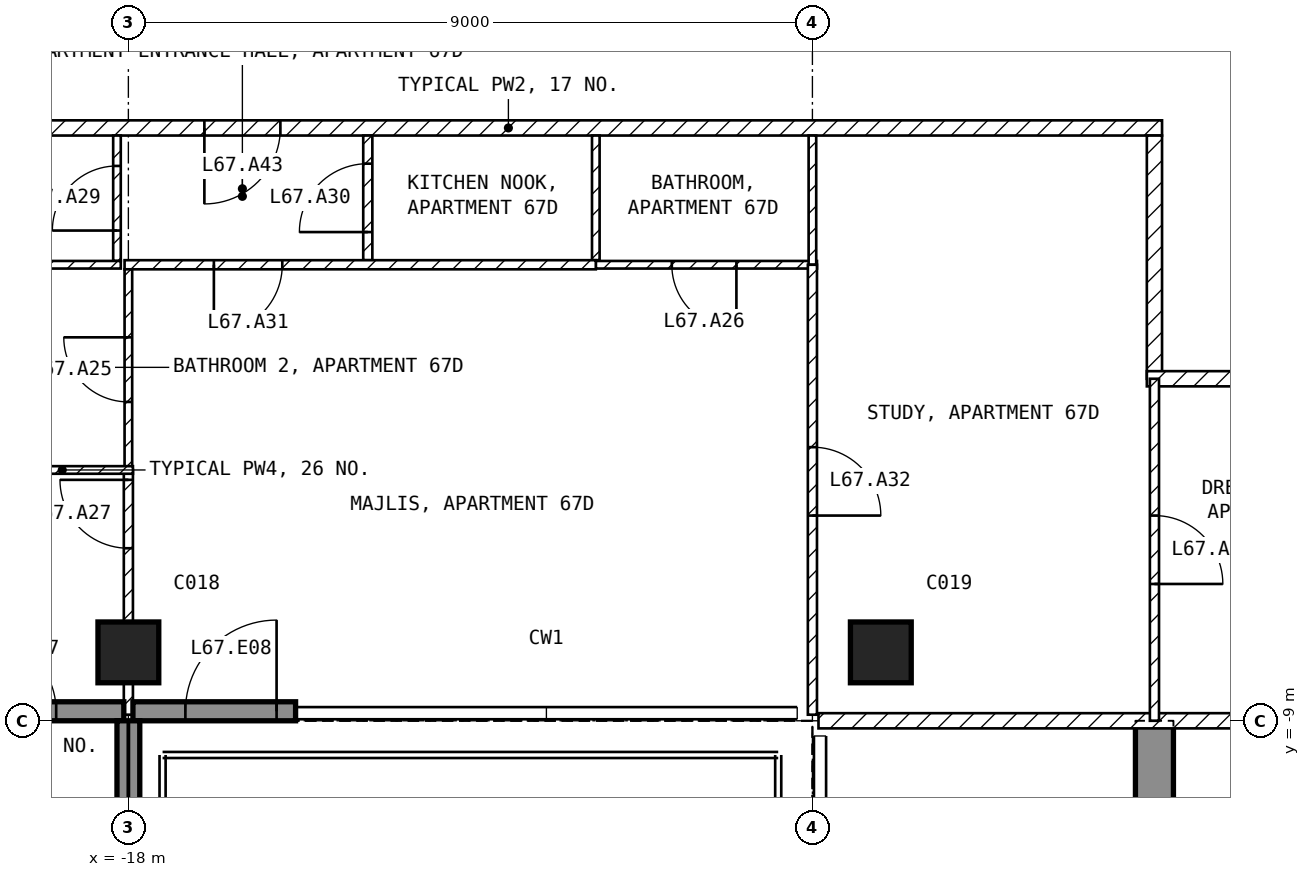
"""IFC4 building model, lengths in metres.
Left out: names, types, materials, properties, quantities, classifications, styles, units other than length and angle.
Written with IfcOpenShell. Run it as: python <this file> out.ifc"""

import sys

from ifc_helpers import new_model, si_unit, direction, frame, frame_2d, origin, origin_2d, place, context, subcontext, project, spatial, polyline, rectangle, outline, extrude, element, fill, save


model = new_model("IFC4")
c1 = context("Model", 3, precision=1e-05, world=origin(), true_north=direction((0.0, 1.0)))
c2 = subcontext(c1, "Body", "Model", "MODEL_VIEW")
j1 = project(units=[si_unit("LENGTHUNIT", "METRE"), si_unit("PLANEANGLEUNIT", "RADIAN")], contexts=[c1])
p1 = place(None, origin())
s1 = spatial("IfcSite", under=j1, at=p1, CompositionType="ELEMENT")
p2 = place(p1, origin())
s2 = spatial("IfcBuilding", under=s1, at=p2, CompositionType="ELEMENT")
p3 = place(p2, frame((0.0, 0.0, 264.0)))
s3 = spatial("IfcBuildingStorey", under=s2, at=p3, CompositionType="ELEMENT", Elevation=264.0)
for number, where, z_axis, x_axis in (
    (1, (-18.0, -8.1, -0.25), (0.0, 0.0, 1.0), (1.0, 0.0, 0.0)),
    (2, (-8.1, -8.1, -0.25), (0.0, 0.0, 1.0), (1.0, 0.0, 0.0)),
):
    element("IfcColumn", number, at=place(p3, frame(where, z_axis=z_axis, x_axis=x_axis)), inside=s3, PredefinedType="COLUMN", context=c2, shape_type="SweptSolid", body=[
        extrude(rectangle(XDim=0.8, YDim=0.8, at=origin_2d()), origin(), (0.0, 0.0, 1.0), 3.5),
    ])
p4 = place(p3, frame((-4.75, -16.7, -0.25), z_axis=(1.0, 0.0, 0.0), x_axis=(0.0, 1.0, 0.0)))
e3 = element("IfcWall", 3, at=p4, inside=s3, PredefinedType="SHEAR", context=c2, shape_type="SweptSolid", body=[
    extrude(outline(polyline([(0.0, 0.0), (3.2, 0.0), (3.2, 2.65), (5.6, 2.65), (5.6, 0.0), (7.7, 0.0), (7.7, 3.5), (0.0, 3.5), (0.0, 0.0)])), origin(), (0.0, 0.0, 1.0), 0.5),
])
p5 = place(p3, frame((-21.1, -8.875, 0.0), z_axis=(0.0, 0.0, 1.0), x_axis=(1.0, 0.0, 0.0)))
e4 = element("IfcWall", 4, at=p5, inside=s3, PredefinedType="SOLIDWALL", context=c2, shape_type="SweptSolid", body=[
    extrude(rectangle(XDim=3.04, YDim=0.25, at=frame_2d((1.52, 0.0))), origin(), (0.0, 0.0, 1.0), 3.25),
])
p6 = place(p5, frame((1.15, 0.0, 0.0)))
e5 = element("IfcOpeningElement", 5, at=p6, cuts=e4, PredefinedType="OPENING", context=c2, shape_type="SweptSolid", body=[
    extrude(rectangle(XDim=1.0, YDim=2.4, at=frame_2d((0.5, 1.2))), frame((0.0, 0.135, 0.0), z_axis=(0.0, -1.0, 0.0), x_axis=(1.0, 0.0, 0.0)), (0.0, 0.0, 1.0), 0.27),
])
p7 = place(p3, frame((-17.94, -8.875, 0.0), z_axis=(0.0, 0.0, 1.0), x_axis=(1.0, 0.0, 0.0)))
e6 = element("IfcWall", 6, at=p7, inside=s3, PredefinedType="SOLIDWALL", context=c2, shape_type="SweptSolid", body=[
    extrude(rectangle(XDim=2.14, YDim=0.25, at=frame_2d((1.07, 0.0))), origin(), (0.0, 0.0, 1.0), 3.25),
])
p8 = place(p7, frame((0.69, 0.0, 0.0)))
e7 = element("IfcOpeningElement", 7, at=p8, cuts=e6, PredefinedType="OPENING", context=c2, shape_type="SweptSolid", body=[
    extrude(rectangle(XDim=1.2, YDim=2.4, at=frame_2d((0.6, 1.2))), frame((0.0, 0.135, 0.0), z_axis=(0.0, -1.0, 0.0), x_axis=(1.0, 0.0, 0.0)), (0.0, 0.0, 1.0), 0.27),
])
p9 = place(p3, frame((-18.0, -9.0, 0.0), z_axis=(0.0, 0.0, 1.0), x_axis=(0.0, -1.0, 0.0)))
e8 = element("IfcWall", 8, at=p9, inside=s3, PredefinedType="SOLIDWALL", context=c2, shape_type="SweptSolid", body=[
    extrude(rectangle(XDim=2.74, YDim=0.3, at=frame_2d((1.37, 0.0))), origin(), (0.0, 0.0, 1.0), 3.25),
])
p10 = place(p3, frame((-4.4, -1.2, 0.0), z_axis=(0.0, 0.0, 1.0), x_axis=(-1.0, 0.0, 0.0)))
e9 = element("IfcWall", 9, at=p10, inside=s3, PredefinedType="PARTITIONING", context=c2, shape_type="SweptSolid", body=[
    extrude(rectangle(XDim=17.2, YDim=0.2, at=frame_2d((8.6, 0.0))), origin(), (0.0, 0.0, 1.0), 3.25),
])
p11 = place(p10, frame((11.6, 0.0, 0.0)))
e10 = element("IfcOpeningElement", 10, at=p11, cuts=e9, PredefinedType="OPENING", context=c2, shape_type="SweptSolid", body=[
    extrude(rectangle(XDim=1.0, YDim=2.1, at=frame_2d((0.5, 1.05))), frame((0.0, 0.11, 0.0), z_axis=(0.0, -1.0, 0.0), x_axis=(1.0, 0.0, 0.0)), (0.0, 0.0, 1.0), 0.22),
])
p12 = place(p3, frame((-4.5, -4.5, 0.0), z_axis=(0.0, 0.0, 1.0), x_axis=(0.0, 1.0, 0.0)))
e11 = element("IfcWall", 11, at=p12, inside=s3, PredefinedType="PARTITIONING", context=c2, shape_type="SweptSolid", body=[
    extrude(rectangle(XDim=3.2, YDim=0.2, at=frame_2d((1.6, 0.0))), origin(), (0.0, 0.0, 1.0), 3.25),
])
p13 = place(p3, frame((-1.1, -4.5, 0.0), z_axis=(0.0, 0.0, 1.0), x_axis=(-1.0, 0.0, 0.0)))
e12 = element("IfcWall", 12, at=p13, inside=s3, PredefinedType="PARTITIONING", context=c2, shape_type="SweptSolid", body=[
    extrude(rectangle(XDim=3.5, YDim=0.2, at=frame_2d((1.75, 0.0))), origin(), (0.0, 0.0, 1.0), 3.25),
])
p14 = place(p3, frame((8.92, -9.0, 0.0), z_axis=(0.0, 0.0, 1.0), x_axis=(-1.0, 0.0, 0.0)))
e13 = element("IfcWall", 13, at=p14, inside=s3, PredefinedType="PARTITIONING", context=c2, shape_type="SweptSolid", body=[
    extrude(rectangle(XDim=17.84, YDim=0.2, at=frame_2d((8.92, 0.0))), origin(), (0.0, 0.0, 1.0), 3.25),
])
p15 = place(p14, frame((8.42, 0.0, 0.0)))
e14 = element("IfcOpeningElement", 14, at=p15, cuts=e13, PredefinedType="OPENING", context=c2, shape_type="SweptSolid", body=[
    extrude(rectangle(XDim=1.0, YDim=2.1, at=frame_2d((0.5, 1.05))), frame((0.0, 0.11, 0.0), z_axis=(0.0, -1.0, 0.0), x_axis=(1.0, 0.0, 0.0)), (0.0, 0.0, 1.0), 0.22),
])
p16 = place(p3, frame((-11.85, -2.94, 0.0), z_axis=(0.0, 0.0, 1.0), x_axis=(0.0, 1.0, 0.0)))
e15 = element("IfcWall", 15, at=p16, inside=s3, PredefinedType="PARTITIONING", context=c2, shape_type="SweptSolid", body=[
    extrude(rectangle(XDim=1.64, YDim=0.1, at=frame_2d((0.82, 0.0))), origin(), (0.0, 0.0, 1.0), 3.25),
])
p17 = place(p3, frame((-8.94, -3.0, 0.0), z_axis=(0.0, 0.0, 1.0), x_axis=(-1.0, 0.0, 0.0)))
e16 = element("IfcWall", 16, at=p17, inside=s3, PredefinedType="PARTITIONING", context=c2, shape_type="SweptSolid", body=[
    extrude(rectangle(XDim=2.91, YDim=0.1, at=frame_2d((1.455, 0.0))), origin(), (0.0, 0.0, 1.0), 3.25),
])
p18 = place(p17, frame((1.06, 0.0, 0.0)))
e17 = element("IfcOpeningElement", 17, at=p18, cuts=e16, PredefinedType="OPENING", context=c2, shape_type="SweptSolid", body=[
    extrude(rectangle(XDim=0.85, YDim=2.1, at=frame_2d((0.425, 1.05))), frame((0.0, 0.06, 0.0), z_axis=(0.0, -1.0, 0.0), x_axis=(1.0, 0.0, 0.0)), (0.0, 0.0, 1.0), 0.12),
])
p19 = place(p3, frame((-9.0, -1.3, 0.0), z_axis=(0.0, 0.0, 1.0), x_axis=(0.0, -1.0, 0.0)))
e18 = element("IfcWall", 18, at=p19, inside=s3, PredefinedType="PARTITIONING", context=c2, shape_type="SweptSolid", body=[
    extrude(rectangle(XDim=1.7, YDim=0.1, at=frame_2d((0.85, 0.0))), origin(), (0.0, 0.0, 1.0), 3.25),
])
p20 = place(p3, frame((-14.85, -2.94, 0.0), z_axis=(0.0, 0.0, 1.0), x_axis=(0.0, 1.0, 0.0)))
e19 = element("IfcWall", 19, at=p20, inside=s3, PredefinedType="PARTITIONING", context=c2, shape_type="SweptSolid", body=[
    extrude(rectangle(XDim=1.64, YDim=0.12, at=frame_2d((0.82, 0.0))), origin(), (0.0, 0.0, 1.0), 3.25),
])
p21 = place(p20, frame((0.37, 0.0, 0.0)))
e20 = element("IfcOpeningElement", 20, at=p21, cuts=e19, PredefinedType="OPENING", context=c2, shape_type="SweptSolid", body=[
    extrude(rectangle(XDim=0.9, YDim=2.1, at=frame_2d((0.45, 1.05))), frame((0.0, 0.07, 0.0), z_axis=(0.0, -1.0, 0.0), x_axis=(1.0, 0.0, 0.0)), (0.0, 0.0, 1.0), 0.14),
])
p22 = place(p3, frame((-11.85, -3.0, 0.0), z_axis=(0.0, 0.0, 1.0), x_axis=(-1.0, 0.0, 0.0)))
e21 = element("IfcWall", 21, at=p22, inside=s3, PredefinedType="PARTITIONING", context=c2, shape_type="SweptSolid", body=[
    extrude(rectangle(XDim=6.2, YDim=0.12, at=frame_2d((3.1, 0.0))), origin(), (0.0, 0.0, 1.0), 3.25),
])
p23 = place(p22, frame((4.125, 0.0, 0.0)))
e22 = element("IfcOpeningElement", 22, at=p23, cuts=e21, PredefinedType="OPENING", context=c2, shape_type="SweptSolid", body=[
    extrude(rectangle(XDim=0.9, YDim=2.1, at=frame_2d((0.45, 1.05))), frame((0.0, 0.07, 0.0), z_axis=(0.0, -1.0, 0.0), x_axis=(1.0, 0.0, 0.0)), (0.0, 0.0, 1.0), 0.14),
])
p24 = place(p3, frame((-18.15, -2.95, 0.0), z_axis=(0.0, 0.0, 1.0), x_axis=(0.0, 1.0, 0.0)))
e23 = element("IfcWall", 23, at=p24, inside=s3, PredefinedType="PARTITIONING", context=c2, shape_type="SweptSolid", body=[
    extrude(rectangle(XDim=1.65, YDim=0.1, at=frame_2d((0.825, 0.0))), origin(), (0.0, 0.0, 1.0), 2.496),
])
p25 = place(p24, frame((0.4, 0.0, 0.0)))
e24 = element("IfcOpeningElement", 24, at=p25, cuts=e23, PredefinedType="OPENING", context=c2, shape_type="SweptSolid", body=[
    extrude(rectangle(XDim=0.85, YDim=2.1, at=frame_2d((0.425, 1.05))), frame((0.0, 0.06, 0.0), z_axis=(0.0, -1.0, 0.0), x_axis=(1.0, 0.0, 0.0)), (0.0, 0.0, 1.0), 0.12),
])
p26 = place(p3, frame((-18.1, -3.0, 0.0), z_axis=(0.0, 0.0, 1.0), x_axis=(-1.0, 0.0, 0.0)))
e25 = element("IfcWall", 25, at=p26, inside=s3, PredefinedType="PARTITIONING", context=c2, shape_type="SweptSolid", body=[
    extrude(rectangle(XDim=3.5, YDim=0.1, at=frame_2d((1.75, 0.0))), origin(), (0.0, 0.0, 1.0), 3.25),
])
p27 = place(p3, frame((-18.0, -5.7, 0.0), z_axis=(0.0, 0.0, 1.0), x_axis=(0.0, 1.0, 0.0)))
e26 = element("IfcWall", 26, at=p27, inside=s3, PredefinedType="PARTITIONING", context=c2, shape_type="SweptSolid", body=[
    extrude(rectangle(XDim=2.64, YDim=0.1, at=frame_2d((1.32, 0.0))), origin(), (0.0, 0.0, 1.0), 2.496),
])
p28 = place(p27, frame((0.895, 0.0, 0.0)))
e27 = element("IfcOpeningElement", 27, at=p28, cuts=e26, PredefinedType="OPENING", context=c2, shape_type="SweptSolid", body=[
    extrude(rectangle(XDim=0.85, YDim=2.1, at=frame_2d((0.425, 1.05))), frame((0.0, 0.06, 0.0), z_axis=(0.0, -1.0, 0.0), x_axis=(1.0, 0.0, 0.0)), (0.0, 0.0, 1.0), 0.12),
])
p29 = place(p3, frame((-18.0, -8.92, 0.0), z_axis=(0.0, 0.0, 1.0), x_axis=(0.0, 1.0, 0.0)))
e28 = element("IfcWall", 28, at=p29, inside=s3, PredefinedType="PARTITIONING", context=c2, shape_type="SweptSolid", body=[
    extrude(rectangle(XDim=3.22, YDim=0.12, at=frame_2d((1.61, 0.0))), origin(), (0.0, 0.0, 1.0), 2.496),
])
p30 = place(p29, frame((2.19, 0.0, 0.0)))
e29 = element("IfcOpeningElement", 29, at=p30, cuts=e28, PredefinedType="OPENING", context=c2, shape_type="SweptSolid", body=[
    extrude(rectangle(XDim=0.9, YDim=2.1, at=frame_2d((0.45, 1.05))), frame((0.0, 0.07, 0.0), z_axis=(0.0, -1.0, 0.0), x_axis=(1.0, 0.0, 0.0)), (0.0, 0.0, 1.0), 0.14),
])
p31 = place(p3, frame((-9.0, -3.0, 0.0), z_axis=(0.0, 0.0, 1.0), x_axis=(0.0, -1.0, 0.0)))
e30 = element("IfcWall", 30, at=p31, inside=s3, PredefinedType="PARTITIONING", context=c2, shape_type="SweptSolid", body=[
    extrude(rectangle(XDim=5.92, YDim=0.12, at=frame_2d((2.96, 0.0))), origin(), (0.0, 0.0, 1.0), 3.25),
])
p32 = place(p31, frame((2.4, 0.0, 0.0)))
e31 = element("IfcOpeningElement", 31, at=p32, cuts=e30, PredefinedType="OPENING", context=c2, shape_type="SweptSolid", body=[
    extrude(rectangle(XDim=0.9, YDim=2.1, at=frame_2d((0.45, 1.05))), frame((0.0, 0.07, 0.0), z_axis=(0.0, -1.0, 0.0), x_axis=(1.0, 0.0, 0.0)), (0.0, 0.0, 1.0), 0.14),
])
p33 = place(p3, frame((-17.94, -5.7, 0.0), z_axis=(0.0, 0.0, 1.0), x_axis=(-1.0, 0.0, 0.0)))
e32 = element("IfcWall", 32, at=p33, inside=s3, PredefinedType="PARTITIONING", context=c2, shape_type="SweptSolid", body=[
    extrude(rectangle(XDim=1.86, YDim=0.1, at=frame_2d((0.93, 0.0))), origin(), (0.0, 0.0, 1.0), 3.25),
])
p34 = place(p3, frame((-4.5, -4.5, 0.0), z_axis=(0.0, 0.0, 1.0), x_axis=(0.0, -1.0, 0.0)))
e33 = element("IfcWall", 33, at=p34, inside=s3, PredefinedType="PARTITIONING", context=c2, shape_type="SweptSolid", body=[
    extrude(rectangle(XDim=4.5, YDim=0.12, at=frame_2d((2.25, 0.0))), origin(), (0.0, 0.0, 1.0), 3.25),
])
p35 = place(p34, frame((1.8, 0.0, 0.0)))
e34 = element("IfcOpeningElement", 34, at=p35, cuts=e33, PredefinedType="OPENING", context=c2, shape_type="SweptSolid", body=[
    extrude(rectangle(XDim=0.9, YDim=2.1, at=frame_2d((0.45, 1.05))), frame((0.0, 0.07, 0.0), z_axis=(0.0, -1.0, 0.0), x_axis=(1.0, 0.0, 0.0)), (0.0, 0.0, 1.0), 0.14),
])
p36 = place(p6, origin())
e35 = element("IfcDoor", 35, at=p36, inside=s3, OperationType="SINGLE_SWING_LEFT", PredefinedType="DOOR", context=c2, shape_type="SweptSolid", body=[
    extrude(rectangle(XDim=1.0, YDim=2.4, at=frame_2d((0.5, 1.2))), frame((0.0, 0.025, 0.0), z_axis=(0.0, -1.0, 0.0), x_axis=(1.0, 0.0, 0.0)), (0.0, 0.0, 1.0), 0.05),
])
fill(e5, e35)
p37 = place(p8, origin())
e36 = element("IfcDoor", 36, at=p37, inside=s3, OperationType="SINGLE_SWING_RIGHT", PredefinedType="DOOR", context=c2, shape_type="SweptSolid", body=[
    extrude(rectangle(XDim=1.2, YDim=2.4, at=frame_2d((0.6, 1.2))), frame((0.0, 0.025, 0.0), z_axis=(0.0, -1.0, 0.0), x_axis=(1.0, 0.0, 0.0)), (0.0, 0.0, 1.0), 0.05),
])
fill(e7, e36)
p38 = place(p28, origin())
e37 = element("IfcDoor", 37, at=p38, inside=s3, OperationType="SINGLE_SWING_RIGHT", PredefinedType="DOOR", context=c2, shape_type="SweptSolid", body=[
    extrude(rectangle(XDim=0.85, YDim=2.1, at=frame_2d((0.425, 1.05))), frame((0.0, 0.025, 0.0), z_axis=(0.0, -1.0, 0.0), x_axis=(1.0, 0.0, 0.0)), (0.0, 0.0, 1.0), 0.05),
])
fill(e27, e37)
p39 = place(p18, origin())
e38 = element("IfcDoor", 38, at=p39, inside=s3, OperationType="SINGLE_SWING_LEFT", PredefinedType="DOOR", context=c2, shape_type="SweptSolid", body=[
    extrude(rectangle(XDim=0.85, YDim=2.1, at=frame_2d((0.425, 1.05))), frame((0.0, 0.025, 0.0), z_axis=(0.0, -1.0, 0.0), x_axis=(1.0, 0.0, 0.0)), (0.0, 0.0, 1.0), 0.05),
])
fill(e17, e38)
p40 = place(p30, origin())
e39 = element("IfcDoor", 39, at=p40, inside=s3, OperationType="SINGLE_SWING_RIGHT", PredefinedType="DOOR", context=c2, shape_type="SweptSolid", body=[
    extrude(rectangle(XDim=0.9, YDim=2.1, at=frame_2d((0.45, 1.05))), frame((0.0, 0.025, 0.0), z_axis=(0.0, -1.0, 0.0), x_axis=(1.0, 0.0, 0.0)), (0.0, 0.0, 1.0), 0.05),
])
fill(e29, e39)
p41 = place(p35, origin())
e40 = element("IfcDoor", 40, at=p41, inside=s3, OperationType="SINGLE_SWING_RIGHT", PredefinedType="DOOR", context=c2, shape_type="SweptSolid", body=[
    extrude(rectangle(XDim=0.9, YDim=2.1, at=frame_2d((0.45, 1.05))), frame((0.0, 0.025, 0.0), z_axis=(0.0, -1.0, 0.0), x_axis=(1.0, 0.0, 0.0)), (0.0, 0.0, 1.0), 0.05),
])
fill(e34, e40)
p42 = place(p25, origin())
e41 = element("IfcDoor", 41, at=p42, inside=s3, OperationType="SINGLE_SWING_LEFT", PredefinedType="DOOR", context=c2, shape_type="SweptSolid", body=[
    extrude(rectangle(XDim=0.85, YDim=2.1, at=frame_2d((0.425, 1.05))), frame((0.0, 0.025, 0.0), z_axis=(0.0, -1.0, 0.0), x_axis=(1.0, 0.0, 0.0)), (0.0, 0.0, 1.0), 0.05),
])
fill(e24, e41)
p43 = place(p21, origin())
e42 = element("IfcDoor", 42, at=p43, inside=s3, OperationType="SINGLE_SWING_LEFT", PredefinedType="DOOR", context=c2, shape_type="SweptSolid", body=[
    extrude(rectangle(XDim=0.9, YDim=2.1, at=frame_2d((0.45, 1.05))), frame((0.0, 0.025, 0.0), z_axis=(0.0, -1.0, 0.0), x_axis=(1.0, 0.0, 0.0)), (0.0, 0.0, 1.0), 0.05),
])
fill(e20, e42)
p44 = place(p23, origin())
e43 = element("IfcDoor", 43, at=p44, inside=s3, OperationType="SINGLE_SWING_RIGHT", PredefinedType="DOOR", context=c2, shape_type="SweptSolid", body=[
    extrude(rectangle(XDim=0.9, YDim=2.1, at=frame_2d((0.45, 1.05))), frame((0.0, 0.025, 0.0), z_axis=(0.0, -1.0, 0.0), x_axis=(1.0, 0.0, 0.0)), (0.0, 0.0, 1.0), 0.05),
])
fill(e22, e43)
p45 = place(p32, origin())
e44 = element("IfcDoor", 44, at=p45, inside=s3, OperationType="SINGLE_SWING_RIGHT", PredefinedType="DOOR", context=c2, shape_type="SweptSolid", body=[
    extrude(rectangle(XDim=0.9, YDim=2.1, at=frame_2d((0.45, 1.05))), frame((0.0, 0.025, 0.0), z_axis=(0.0, -1.0, 0.0), x_axis=(1.0, 0.0, 0.0)), (0.0, 0.0, 1.0), 0.05),
])
fill(e31, e44)
p46 = place(p11, origin())
e45 = element("IfcDoor", 45, at=p46, inside=s3, OperationType="SINGLE_SWING_RIGHT", PredefinedType="DOOR", context=c2, shape_type="SweptSolid", body=[
    extrude(rectangle(XDim=1.0, YDim=2.1, at=frame_2d((0.5, 1.05))), frame((0.0, 0.025, 0.0), z_axis=(0.0, -1.0, 0.0), x_axis=(1.0, 0.0, 0.0)), (0.0, 0.0, 1.0), 0.05),
])
fill(e10, e45)
save(model, sys.argv[1])
